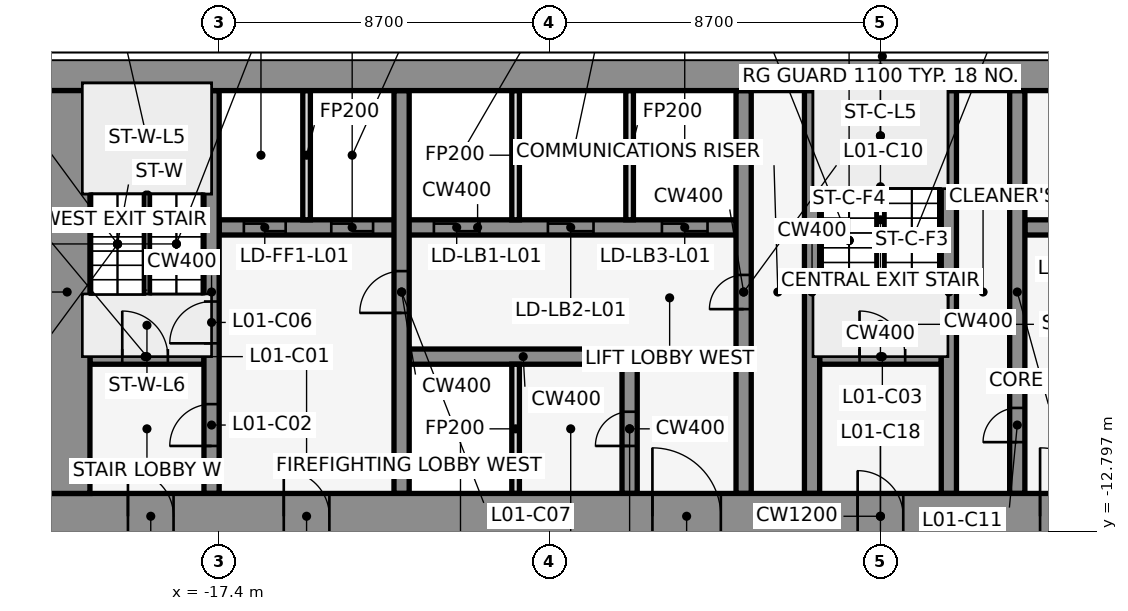
"""IFC4 building model, lengths in metres.
Left out: names, types, materials, properties, quantities, classifications, styles, units other than length and angle.
Written with IfcOpenShell. Run it as: python <this file> out.ifc"""

import sys

from ifc_helpers import new_model, si_unit, direction, frame, frame_2d, origin, place, context, subcontext, project, spatial, rectangle, extrude, element, fill, save


model = new_model("IFC4")
c1 = context("Model", 3, precision=1e-05, world=origin(), true_north=direction((0.0, 1.0)))
c2 = subcontext(c1, "Body", "Model", "MODEL_VIEW")
j1 = project(units=[si_unit("LENGTHUNIT", "METRE"), si_unit("PLANEANGLEUNIT", "RADIAN")], contexts=[c1])
p1 = place(None, origin())
s1 = spatial("IfcSite", under=j1, at=p1, CompositionType="ELEMENT")
p2 = place(p1, origin())
s2 = spatial("IfcBuilding", under=s1, at=p2, CompositionType="ELEMENT")
p3 = place(p2, frame((0.0, 0.0, 8.0)))
s3 = spatial("IfcBuildingStorey", under=s2, at=p3, CompositionType="ELEMENT", Elevation=8.0)
p4 = place(p3, frame((-20.8, -8.2, 0.0), z_axis=(0.0, 0.0, 1.0), x_axis=(1.0, 0.0, 0.0)))
e1 = element("IfcWall", 1, at=p4, inside=s3, PredefinedType="SHEAR", context=c2, shape_type="SweptSolid", body=[
    extrude(rectangle(XDim=3.0, YDim=0.4, at=frame_2d((1.5, 0.0))), origin(), (0.0, 0.0, 1.0), 6.0),
])
p5 = place(p4, frame((0.85, 0.0, 0.0)))
e2 = element("IfcOpeningElement", 2, at=p5, cuts=e1, PredefinedType="OPENING", context=c2, shape_type="SweptSolid", body=[
    extrude(rectangle(XDim=1.2, YDim=2.1, at=frame_2d((0.6, 1.05))), frame((0.0, 0.212, 0.0), z_axis=(0.0, -1.0, 0.0), x_axis=(1.0, 0.0, 0.0)), (0.0, 0.0, 1.0), 0.424),
])
p6 = place(p3, frame((-12.4, -8.2, 0.0), z_axis=(0.0, 0.0, 1.0), x_axis=(1.0, 0.0, 0.0)))
e3 = element("IfcWall", 3, at=p6, inside=s3, PredefinedType="SHEAR", context=c2, shape_type="SweptSolid", body=[
    extrude(rectangle(XDim=6.0, YDim=0.4, at=frame_2d((3.0, 0.0))), origin(), (0.0, 0.0, 1.0), 6.0),
])
p7 = place(p3, frame((-1.6, -8.2, 0.0), z_axis=(0.0, 0.0, 1.0), x_axis=(1.0, 0.0, 0.0)))
e4 = element("IfcWall", 4, at=p7, inside=s3, PredefinedType="SHEAR", context=c2, shape_type="SweptSolid", body=[
    extrude(rectangle(XDim=3.2, YDim=0.4, at=frame_2d((1.6, 0.0))), origin(), (0.0, 0.0, 1.0), 6.0),
])
p8 = place(p7, frame((1.05, 0.0, 0.0)))
e5 = element("IfcOpeningElement", 5, at=p8, cuts=e4, PredefinedType="OPENING", context=c2, shape_type="SweptSolid", body=[
    extrude(rectangle(XDim=1.2, YDim=2.1, at=frame_2d((0.6, 1.05))), frame((0.0, 0.212, 0.0), z_axis=(0.0, -1.0, 0.0), x_axis=(1.0, 0.0, 0.0)), (0.0, 0.0, 1.0), 0.424),
])
p9 = place(p3, frame((-17.4, -4.8, 0.0), z_axis=(0.0, 0.0, 1.0), x_axis=(1.0, 0.0, 0.0)))
e6 = element("IfcWall", 6, at=p9, inside=s3, PredefinedType="SHEAR", context=c2, shape_type="SweptSolid", body=[
    extrude(rectangle(XDim=13.6, YDim=0.4, at=frame_2d((6.8, 0.0))), origin(), (0.0, 0.0, 1.0), 6.0),
])
p10 = place(p9, frame((0.65, 0.0, 0.0)))
e7 = element("IfcOpeningElement", 7, at=p10, cuts=e6, PredefinedType="OPENING", context=c2, shape_type="SweptSolid", body=[
    extrude(rectangle(XDim=1.1, YDim=2.1, at=frame_2d((0.55, 1.05))), frame((0.0, 0.212, 0.0), z_axis=(0.0, -1.0, 0.0), x_axis=(1.0, 0.0, 0.0)), (0.0, 0.0, 1.0), 0.424),
])
p11 = place(p9, frame((2.95, 0.0, 0.0)))
e8 = element("IfcOpeningElement", 8, at=p11, cuts=e6, PredefinedType="OPENING", context=c2, shape_type="SweptSolid", body=[
    extrude(rectangle(XDim=1.1, YDim=2.1, at=frame_2d((0.55, 1.05))), frame((0.0, 0.212, 0.0), z_axis=(0.0, -1.0, 0.0), x_axis=(1.0, 0.0, 0.0)), (0.0, 0.0, 1.0), 0.424),
])
p12 = place(p9, frame((5.65, 0.0, 0.0)))
e9 = element("IfcOpeningElement", 9, at=p12, cuts=e6, PredefinedType="OPENING", context=c2, shape_type="SweptSolid", body=[
    extrude(rectangle(XDim=1.2, YDim=2.1, at=frame_2d((0.6, 1.05))), frame((0.0, 0.212, 0.0), z_axis=(0.0, -1.0, 0.0), x_axis=(1.0, 0.0, 0.0)), (0.0, 0.0, 1.0), 0.424),
])
p13 = place(p9, frame((8.65, 0.0, 0.0)))
e10 = element("IfcOpeningElement", 10, at=p13, cuts=e6, PredefinedType="OPENING", context=c2, shape_type="SweptSolid", body=[
    extrude(rectangle(XDim=1.2, YDim=2.1, at=frame_2d((0.6, 1.05))), frame((0.0, 0.212, 0.0), z_axis=(0.0, -1.0, 0.0), x_axis=(1.0, 0.0, 0.0)), (0.0, 0.0, 1.0), 0.424),
])
p14 = place(p9, frame((11.65, 0.0, 0.0)))
e11 = element("IfcOpeningElement", 11, at=p14, cuts=e6, PredefinedType="OPENING", context=c2, shape_type="SweptSolid", body=[
    extrude(rectangle(XDim=1.2, YDim=2.1, at=frame_2d((0.6, 1.05))), frame((0.0, 0.212, 0.0), z_axis=(0.0, -1.0, 0.0), x_axis=(1.0, 0.0, 0.0)), (0.0, 0.0, 1.0), 0.424),
])
p15 = place(p3, frame((3.8, -4.8, 0.0), z_axis=(0.0, 0.0, 1.0), x_axis=(1.0, 0.0, 0.0)))
e12 = element("IfcWall", 12, at=p15, inside=s3, PredefinedType="SHEAR", context=c2, shape_type="SweptSolid", body=[
    extrude(rectangle(XDim=13.6, YDim=0.4, at=frame_2d((6.8, 0.0))), origin(), (0.0, 0.0, 1.0), 6.0),
])
p16 = place(p15, frame((9.45, 0.0, 0.0)))
e13 = element("IfcOpeningElement", 13, at=p16, cuts=e12, PredefinedType="OPENING", context=c2, shape_type="SweptSolid", body=[
    extrude(rectangle(XDim=1.1, YDim=2.1, at=frame_2d((0.55, 1.05))), frame((0.0, 0.212, 0.0), z_axis=(0.0, -1.0, 0.0), x_axis=(1.0, 0.0, 0.0)), (0.0, 0.0, 1.0), 0.424),
])
p17 = place(p15, frame((11.85, 0.0, 0.0)))
e14 = element("IfcOpeningElement", 14, at=p17, cuts=e12, PredefinedType="OPENING", context=c2, shape_type="SweptSolid", body=[
    extrude(rectangle(XDim=1.1, YDim=2.1, at=frame_2d((0.55, 1.05))), frame((0.0, 0.212, 0.0), z_axis=(0.0, -1.0, 0.0), x_axis=(1.0, 0.0, 0.0)), (0.0, 0.0, 1.0), 0.424),
])
p18 = place(p15, frame((0.95, 0.0, 0.0)))
e15 = element("IfcOpeningElement", 15, at=p18, cuts=e12, PredefinedType="OPENING", context=c2, shape_type="SweptSolid", body=[
    extrude(rectangle(XDim=0.9, YDim=2.1, at=frame_2d((0.45, 1.05))), frame((0.0, 0.212, 0.0), z_axis=(0.0, -1.0, 0.0), x_axis=(1.0, 0.0, 0.0)), (0.0, 0.0, 1.0), 0.424),
])
p19 = place(p15, frame((3.85, 0.0, 0.0)))
e16 = element("IfcOpeningElement", 16, at=p19, cuts=e12, PredefinedType="OPENING", context=c2, shape_type="SweptSolid", body=[
    extrude(rectangle(XDim=0.9, YDim=2.1, at=frame_2d((0.45, 1.05))), frame((0.0, 0.212, 0.0), z_axis=(0.0, -1.0, 0.0), x_axis=(1.0, 0.0, 0.0)), (0.0, 0.0, 1.0), 0.424),
])
p20 = place(p15, frame((6.85, 0.0, 0.0)))
e17 = element("IfcOpeningElement", 17, at=p20, cuts=e12, PredefinedType="OPENING", context=c2, shape_type="SweptSolid", body=[
    extrude(rectangle(XDim=0.9, YDim=2.1, at=frame_2d((0.45, 1.05))), frame((0.0, 0.212, 0.0), z_axis=(0.0, -1.0, 0.0), x_axis=(1.0, 0.0, 0.0)), (0.0, 0.0, 1.0), 0.424),
])
p21 = place(p3, frame((-17.6, -11.8, 0.0), z_axis=(0.0, 0.0, 1.0), x_axis=(0.0, 1.0, 0.0)))
e18 = element("IfcWall", 18, at=p21, inside=s3, PredefinedType="SHEAR", context=c2, shape_type="SweptSolid", body=[
    extrude(rectangle(XDim=10.6, YDim=0.4, at=frame_2d((5.3, 0.0))), origin(), (0.0, 0.0, 1.0), 6.0),
])
p22 = place(p21, frame((1.25, 0.0, 0.0)))
e19 = element("IfcOpeningElement", 19, at=p22, cuts=e18, PredefinedType="OPENING", context=c2, shape_type="SweptSolid", body=[
    extrude(rectangle(XDim=1.1, YDim=2.1, at=frame_2d((0.55, 1.05))), frame((0.0, 0.212, 0.0), z_axis=(0.0, -1.0, 0.0), x_axis=(1.0, 0.0, 0.0)), (0.0, 0.0, 1.0), 0.424),
])
p23 = place(p21, frame((3.95, 0.0, 0.0)))
e20 = element("IfcOpeningElement", 20, at=p23, cuts=e18, PredefinedType="OPENING", context=c2, shape_type="SweptSolid", body=[
    extrude(rectangle(XDim=1.1, YDim=2.1, at=frame_2d((0.55, 1.05))), frame((0.0, 0.212, 0.0), z_axis=(0.0, -1.0, 0.0), x_axis=(1.0, 0.0, 0.0)), (0.0, 0.0, 1.0), 0.424),
])
p24 = place(p3, frame((-15.1, -4.6, 0.0), z_axis=(0.0, 0.0, 1.0), x_axis=(0.0, 1.0, 0.0)))
e21 = element("IfcWall", 21, at=p24, inside=s3, PredefinedType="PARTITIONING", context=c2, shape_type="SweptSolid", body=[
    extrude(rectangle(XDim=3.4, YDim=0.2, at=frame_2d((1.7, 0.0))), origin(), (0.0, 0.0, 1.0), 5.7),
])
p25 = place(p3, frame((-12.6, -11.8, 0.0), z_axis=(0.0, 0.0, 1.0), x_axis=(0.0, 1.0, 0.0)))
e22 = element("IfcWall", 22, at=p25, inside=s3, PredefinedType="SHEAR", context=c2, shape_type="SweptSolid", body=[
    extrude(rectangle(XDim=10.6, YDim=0.4, at=frame_2d((5.3, 0.0))), origin(), (0.0, 0.0, 1.0), 6.0),
])
p26 = place(p25, frame((4.75, 0.0, 0.0)))
e23 = element("IfcOpeningElement", 23, at=p26, cuts=e22, PredefinedType="OPENING", context=c2, shape_type="SweptSolid", body=[
    extrude(rectangle(XDim=1.1, YDim=2.1, at=frame_2d((0.55, 1.05))), frame((0.0, 0.212, 0.0), z_axis=(0.0, -1.0, 0.0), x_axis=(1.0, 0.0, 0.0)), (0.0, 0.0, 1.0), 0.424),
])
for number, where, z_axis, x_axis in (
    (24, (-9.6, -11.8, 0.0), (0.0, 0.0, 1.0), (0.0, 1.0, 0.0)),
    (25, (-9.6, -4.6, 0.0), (0.0, 0.0, 1.0), (0.0, 1.0, 0.0)),
):
    element("IfcWall", number, at=place(p3, frame(where, z_axis=z_axis, x_axis=x_axis)), inside=s3, PredefinedType="PARTITIONING", context=c2, shape_type="SweptSolid", body=[
        extrude(rectangle(XDim=3.4, YDim=0.2, at=frame_2d((1.7, 0.0))), origin(), (0.0, 0.0, 1.0), 5.7),
    ])
p27 = place(p3, frame((-6.6, -11.8, 0.0), z_axis=(0.0, 0.0, 1.0), x_axis=(0.0, 1.0, 0.0)))
e26 = element("IfcWall", 26, at=p27, inside=s3, PredefinedType="SHEAR", context=c2, shape_type="SweptSolid", body=[
    extrude(rectangle(XDim=3.4, YDim=0.4, at=frame_2d((1.7, 0.0))), origin(), (0.0, 0.0, 1.0), 6.0),
])
p28 = place(p27, frame((1.25, 0.0, 0.0)))
e27 = element("IfcOpeningElement", 27, at=p28, cuts=e26, PredefinedType="OPENING", context=c2, shape_type="SweptSolid", body=[
    extrude(rectangle(XDim=0.9, YDim=2.1, at=frame_2d((0.45, 1.05))), frame((0.0, 0.212, 0.0), z_axis=(0.0, -1.0, 0.0), x_axis=(1.0, 0.0, 0.0)), (0.0, 0.0, 1.0), 0.424),
])
p29 = place(p3, frame((-6.6, -4.6, 0.0), z_axis=(0.0, 0.0, 1.0), x_axis=(0.0, 1.0, 0.0)))
e28 = element("IfcWall", 28, at=p29, inside=s3, PredefinedType="PARTITIONING", context=c2, shape_type="SweptSolid", body=[
    extrude(rectangle(XDim=3.4, YDim=0.2, at=frame_2d((1.7, 0.0))), origin(), (0.0, 0.0, 1.0), 5.7),
])
p30 = place(p3, frame((-3.6, -11.8, 0.0), z_axis=(0.0, 0.0, 1.0), x_axis=(0.0, 1.0, 0.0)))
e29 = element("IfcWall", 29, at=p30, inside=s3, PredefinedType="SHEAR", context=c2, shape_type="SweptSolid", body=[
    extrude(rectangle(XDim=10.6, YDim=0.4, at=frame_2d((5.3, 0.0))), origin(), (0.0, 0.0, 1.0), 6.0),
])
p31 = place(p30, frame((4.85, 0.0, 0.0)))
e30 = element("IfcOpeningElement", 30, at=p31, cuts=e29, PredefinedType="OPENING", context=c2, shape_type="SweptSolid", body=[
    extrude(rectangle(XDim=0.9, YDim=2.1, at=frame_2d((0.45, 1.05))), frame((0.0, 0.212, 0.0), z_axis=(0.0, -1.0, 0.0), x_axis=(1.0, 0.0, 0.0)), (0.0, 0.0, 1.0), 0.424),
])
for number, where, z_axis, x_axis in (
    (31, (-1.8, -11.8, 0.0), (0.0, 0.0, 1.0), (0.0, 1.0, 0.0)),
    (32, (1.8, -11.8, 0.0), (0.0, 0.0, 1.0), (0.0, 1.0, 0.0)),
):
    element("IfcWall", number, at=place(p3, frame(where, z_axis=z_axis, x_axis=x_axis)), inside=s3, PredefinedType="SHEAR", context=c2, shape_type="SweptSolid", body=[
        extrude(rectangle(XDim=10.6, YDim=0.4, at=frame_2d((5.3, 0.0))), origin(), (0.0, 0.0, 1.0), 6.0),
    ])
p32 = place(p3, frame((3.6, -11.8, 0.0), z_axis=(0.0, 0.0, 1.0), x_axis=(0.0, 1.0, 0.0)))
e33 = element("IfcWall", 33, at=p32, inside=s3, PredefinedType="SHEAR", context=c2, shape_type="SweptSolid", body=[
    extrude(rectangle(XDim=10.6, YDim=0.4, at=frame_2d((5.3, 0.0))), origin(), (0.0, 0.0, 1.0), 6.0),
])
p33 = place(p32, frame((1.35, 0.0, 0.0)))
e34 = element("IfcOpeningElement", 34, at=p33, cuts=e33, PredefinedType="OPENING", context=c2, shape_type="SweptSolid", body=[
    extrude(rectangle(XDim=0.9, YDim=2.1, at=frame_2d((0.45, 1.05))), frame((0.0, 0.212, 0.0), z_axis=(0.0, -1.0, 0.0), x_axis=(1.0, 0.0, 0.0)), (0.0, 0.0, 1.0), 0.424),
])
p34 = place(p3, frame((-22.0, -0.6, 0.0), z_axis=(0.0, 0.0, 1.0), x_axis=(1.0, 0.0, 0.0)))
e35 = element("IfcWall", 35, at=p34, inside=s3, PredefinedType="SHEAR", context=c2, shape_type="SweptSolid", body=[
    extrude(rectangle(XDim=44.0, YDim=1.2, at=frame_2d((22.0, 0.0))), origin(), (0.0, 0.0, 1.0), 6.0),
])
p35 = place(p3, frame((-22.0, -12.4, 0.0), z_axis=(0.0, 0.0, 1.0), x_axis=(1.0, 0.0, 0.0)))
e36 = element("IfcWall", 36, at=p35, inside=s3, PredefinedType="SHEAR", context=c2, shape_type="SweptSolid", body=[
    extrude(rectangle(XDim=44.0, YDim=1.2, at=frame_2d((22.0, 0.0))), origin(), (0.0, 0.0, 1.0), 6.0),
])
p36 = place(p35, frame((2.2, 0.0, 0.0)))
e37 = element("IfcOpeningElement", 37, at=p36, cuts=e36, PredefinedType="OPENING", context=c2, shape_type="SweptSolid", body=[
    extrude(rectangle(XDim=1.2, YDim=2.1, at=frame_2d((0.6, 1.05))), frame((0.0, 0.612, 0.0), z_axis=(0.0, -1.0, 0.0), x_axis=(1.0, 0.0, 0.0)), (0.0, 0.0, 1.0), 1.224),
])
p37 = place(p35, frame((21.4, 0.0, 0.0)))
e38 = element("IfcOpeningElement", 38, at=p37, cuts=e36, PredefinedType="OPENING", context=c2, shape_type="SweptSolid", body=[
    extrude(rectangle(XDim=1.2, YDim=2.1, at=frame_2d((0.6, 1.05))), frame((0.0, 0.612, 0.0), z_axis=(0.0, -1.0, 0.0), x_axis=(1.0, 0.0, 0.0)), (0.0, 0.0, 1.0), 1.224),
])
p38 = place(p35, frame((40.6, 0.0, 0.0)))
e39 = element("IfcOpeningElement", 39, at=p38, cuts=e36, PredefinedType="OPENING", context=c2, shape_type="SweptSolid", body=[
    extrude(rectangle(XDim=1.2, YDim=2.1, at=frame_2d((0.6, 1.05))), frame((0.0, 0.612, 0.0), z_axis=(0.0, -1.0, 0.0), x_axis=(1.0, 0.0, 0.0)), (0.0, 0.0, 1.0), 1.224),
])
p39 = place(p35, frame((16.0, 0.0, 0.0)))
e40 = element("IfcOpeningElement", 40, at=p39, cuts=e36, PredefinedType="OPENING", context=c2, shape_type="SweptSolid", body=[
    extrude(rectangle(XDim=1.8, YDim=2.1, at=frame_2d((0.9, 1.05))), frame((0.0, 0.612, 0.0), z_axis=(0.0, -1.0, 0.0), x_axis=(1.0, 0.0, 0.0)), (0.0, 0.0, 1.0), 1.224),
])
p40 = place(p35, frame((6.3, 0.0, 0.0)))
e41 = element("IfcOpeningElement", 41, at=p40, cuts=e36, PredefinedType="OPENING", context=c2, shape_type="SweptSolid", body=[
    extrude(rectangle(XDim=1.2, YDim=2.1, at=frame_2d((0.6, 1.05))), frame((0.0, 0.612, 0.0), z_axis=(0.0, -1.0, 0.0), x_axis=(1.0, 0.0, 0.0)), (0.0, 0.0, 1.0), 1.224),
])
p41 = place(p35, frame((26.2, 0.0, 0.0)))
e42 = element("IfcOpeningElement", 42, at=p41, cuts=e36, PredefinedType="OPENING", context=c2, shape_type="SweptSolid", body=[
    extrude(rectangle(XDim=1.8, YDim=2.1, at=frame_2d((0.9, 1.05))), frame((0.0, 0.612, 0.0), z_axis=(0.0, -1.0, 0.0), x_axis=(1.0, 0.0, 0.0)), (0.0, 0.0, 1.0), 1.224),
])
p42 = place(p35, frame((36.5, 0.0, 0.0)))
e43 = element("IfcOpeningElement", 43, at=p42, cuts=e36, PredefinedType="OPENING", context=c2, shape_type="SweptSolid", body=[
    extrude(rectangle(XDim=1.2, YDim=2.1, at=frame_2d((0.6, 1.05))), frame((0.0, 0.612, 0.0), z_axis=(0.0, -1.0, 0.0), x_axis=(1.0, 0.0, 0.0)), (0.0, 0.0, 1.0), 1.224),
])
p43 = place(p3, frame((-21.4, -11.8, 0.0), z_axis=(0.0, 0.0, 1.0), x_axis=(0.0, 1.0, 0.0)))
e44 = element("IfcWall", 44, at=p43, inside=s3, PredefinedType="SHEAR", context=c2, shape_type="SweptSolid", body=[
    extrude(rectangle(XDim=10.6, YDim=1.2, at=frame_2d((5.3, 0.0))), origin(), (0.0, 0.0, 1.0), 6.0),
])
p44 = place(p5, origin())
e45 = element("IfcDoor", 45, at=p44, inside=s3, OperationType="SINGLE_SWING_LEFT", PredefinedType="DOOR", context=c2, shape_type="SweptSolid", body=[
    extrude(rectangle(XDim=1.2, YDim=2.1, at=frame_2d((0.6, 1.05))), frame((0.0, 0.025, 0.0), z_axis=(0.0, -1.0, 0.0), x_axis=(1.0, 0.0, 0.0)), (0.0, 0.0, 1.0), 0.05),
])
fill(e2, e45)
p45 = place(p22, frame((1.1, 0.0, 0.0), z_axis=(0.0, 0.0, 1.0), x_axis=(-1.0, 0.0, 0.0)))
e46 = element("IfcDoor", 46, at=p45, inside=s3, OperationType="SINGLE_SWING_LEFT", PredefinedType="DOOR", context=c2, shape_type="SweptSolid", body=[
    extrude(rectangle(XDim=1.1, YDim=2.1, at=frame_2d((0.55, 1.05))), frame((0.0, 0.025, 0.0), z_axis=(0.0, -1.0, 0.0), x_axis=(1.0, 0.0, 0.0)), (0.0, 0.0, 1.0), 0.05),
])
fill(e19, e46)
p46 = place(p8, origin())
e47 = element("IfcDoor", 47, at=p46, inside=s3, OperationType="SINGLE_SWING_LEFT", PredefinedType="DOOR", context=c2, shape_type="SweptSolid", body=[
    extrude(rectangle(XDim=1.2, YDim=2.1, at=frame_2d((0.6, 1.05))), frame((0.0, 0.025, 0.0), z_axis=(0.0, -1.0, 0.0), x_axis=(1.0, 0.0, 0.0)), (0.0, 0.0, 1.0), 0.05),
])
fill(e5, e47)
p47 = place(p10, origin())
e48 = element("IfcDoor", 48, at=p47, inside=s3, OperationType="DOUBLE_DOOR_SLIDING", PredefinedType="DOOR", context=c2, shape_type="SweptSolid", body=[
    extrude(rectangle(XDim=1.1, YDim=2.1, at=frame_2d((0.55, 1.05))), frame((0.0, 0.025, 0.0), z_axis=(0.0, -1.0, 0.0), x_axis=(1.0, 0.0, 0.0)), (0.0, 0.0, 1.0), 0.05),
])
fill(e7, e48)
p48 = place(p11, origin())
e49 = element("IfcDoor", 49, at=p48, inside=s3, OperationType="DOUBLE_DOOR_SLIDING", PredefinedType="DOOR", context=c2, shape_type="SweptSolid", body=[
    extrude(rectangle(XDim=1.1, YDim=2.1, at=frame_2d((0.55, 1.05))), frame((0.0, 0.025, 0.0), z_axis=(0.0, -1.0, 0.0), x_axis=(1.0, 0.0, 0.0)), (0.0, 0.0, 1.0), 0.05),
])
fill(e8, e49)
p49 = place(p12, origin())
e50 = element("IfcDoor", 50, at=p49, inside=s3, OperationType="DOUBLE_DOOR_SLIDING", PredefinedType="DOOR", context=c2, shape_type="SweptSolid", body=[
    extrude(rectangle(XDim=1.2, YDim=2.1, at=frame_2d((0.6, 1.05))), frame((0.0, 0.025, 0.0), z_axis=(0.0, -1.0, 0.0), x_axis=(1.0, 0.0, 0.0)), (0.0, 0.0, 1.0), 0.05),
])
fill(e9, e50)
p50 = place(p13, origin())
e51 = element("IfcDoor", 51, at=p50, inside=s3, OperationType="DOUBLE_DOOR_SLIDING", PredefinedType="DOOR", context=c2, shape_type="SweptSolid", body=[
    extrude(rectangle(XDim=1.2, YDim=2.1, at=frame_2d((0.6, 1.05))), frame((0.0, 0.025, 0.0), z_axis=(0.0, -1.0, 0.0), x_axis=(1.0, 0.0, 0.0)), (0.0, 0.0, 1.0), 0.05),
])
fill(e10, e51)
p51 = place(p14, origin())
e52 = element("IfcDoor", 52, at=p51, inside=s3, OperationType="DOUBLE_DOOR_SLIDING", PredefinedType="DOOR", context=c2, shape_type="SweptSolid", body=[
    extrude(rectangle(XDim=1.2, YDim=2.1, at=frame_2d((0.6, 1.05))), frame((0.0, 0.025, 0.0), z_axis=(0.0, -1.0, 0.0), x_axis=(1.0, 0.0, 0.0)), (0.0, 0.0, 1.0), 0.05),
])
fill(e11, e52)
p52 = place(p23, frame((1.1, 0.0, 0.0), z_axis=(0.0, 0.0, 1.0), x_axis=(-1.0, 0.0, 0.0)))
e53 = element("IfcDoor", 53, at=p52, inside=s3, OperationType="SINGLE_SWING_LEFT", PredefinedType="DOOR", context=c2, shape_type="SweptSolid", body=[
    extrude(rectangle(XDim=1.1, YDim=2.1, at=frame_2d((0.55, 1.05))), frame((0.0, 0.025, 0.0), z_axis=(0.0, -1.0, 0.0), x_axis=(1.0, 0.0, 0.0)), (0.0, 0.0, 1.0), 0.05),
])
fill(e20, e53)
p53 = place(p26, origin())
e54 = element("IfcDoor", 54, at=p53, inside=s3, OperationType="SINGLE_SWING_LEFT", PredefinedType="DOOR", context=c2, shape_type="SweptSolid", body=[
    extrude(rectangle(XDim=1.1, YDim=2.1, at=frame_2d((0.55, 1.05))), frame((0.0, 0.025, 0.0), z_axis=(0.0, -1.0, 0.0), x_axis=(1.0, 0.0, 0.0)), (0.0, 0.0, 1.0), 0.05),
])
fill(e23, e54)
p54 = place(p31, frame((0.9, 0.0, 0.0), z_axis=(0.0, 0.0, 1.0), x_axis=(-1.0, 0.0, 0.0)))
e55 = element("IfcDoor", 55, at=p54, inside=s3, OperationType="SINGLE_SWING_LEFT", PredefinedType="DOOR", context=c2, shape_type="SweptSolid", body=[
    extrude(rectangle(XDim=0.9, YDim=2.1, at=frame_2d((0.45, 1.05))), frame((0.0, 0.025, 0.0), z_axis=(0.0, -1.0, 0.0), x_axis=(1.0, 0.0, 0.0)), (0.0, 0.0, 1.0), 0.05),
])
fill(e30, e55)
p55 = place(p33, origin())
e56 = element("IfcDoor", 56, at=p55, inside=s3, OperationType="SINGLE_SWING_LEFT", PredefinedType="DOOR", context=c2, shape_type="SweptSolid", body=[
    extrude(rectangle(XDim=0.9, YDim=2.1, at=frame_2d((0.45, 1.05))), frame((0.0, 0.025, 0.0), z_axis=(0.0, -1.0, 0.0), x_axis=(1.0, 0.0, 0.0)), (0.0, 0.0, 1.0), 0.05),
])
fill(e34, e56)
p56 = place(p28, origin())
e57 = element("IfcDoor", 57, at=p56, inside=s3, OperationType="SINGLE_SWING_LEFT", PredefinedType="DOOR", context=c2, shape_type="SweptSolid", body=[
    extrude(rectangle(XDim=0.9, YDim=2.1, at=frame_2d((0.45, 1.05))), frame((0.0, 0.025, 0.0), z_axis=(0.0, -1.0, 0.0), x_axis=(1.0, 0.0, 0.0)), (0.0, 0.0, 1.0), 0.05),
])
fill(e27, e57)
p57 = place(p36, frame((1.2, 0.0, 0.0), z_axis=(0.0, 0.0, 1.0), x_axis=(-1.0, 0.0, 0.0)))
e58 = element("IfcDoor", 58, at=p57, inside=s3, OperationType="SINGLE_SWING_RIGHT", PredefinedType="DOOR", context=c2, shape_type="SweptSolid", body=[
    extrude(rectangle(XDim=1.2, YDim=2.1, at=frame_2d((0.6, 1.05))), frame((0.0, 0.025, 0.0), z_axis=(0.0, -1.0, 0.0), x_axis=(1.0, 0.0, 0.0)), (0.0, 0.0, 1.0), 0.05),
])
fill(e37, e58)
p58 = place(p37, frame((1.2, 0.0, 0.0), z_axis=(0.0, 0.0, 1.0), x_axis=(-1.0, 0.0, 0.0)))
e59 = element("IfcDoor", 59, at=p58, inside=s3, OperationType="SINGLE_SWING_RIGHT", PredefinedType="DOOR", context=c2, shape_type="SweptSolid", body=[
    extrude(rectangle(XDim=1.2, YDim=2.1, at=frame_2d((0.6, 1.05))), frame((0.0, 0.025, 0.0), z_axis=(0.0, -1.0, 0.0), x_axis=(1.0, 0.0, 0.0)), (0.0, 0.0, 1.0), 0.05),
])
fill(e38, e59)
p59 = place(p39, origin())
e60 = element("IfcDoor", 60, at=p59, inside=s3, OperationType="SINGLE_SWING_LEFT", PredefinedType="DOOR", context=c2, shape_type="SweptSolid", body=[
    extrude(rectangle(XDim=1.8, YDim=2.1, at=frame_2d((0.9, 1.05))), frame((0.0, 0.025, 0.0), z_axis=(0.0, -1.0, 0.0), x_axis=(1.0, 0.0, 0.0)), (0.0, 0.0, 1.0), 0.05),
])
fill(e40, e60)
p60 = place(p40, frame((1.2, 0.0, 0.0), z_axis=(0.0, 0.0, 1.0), x_axis=(-1.0, 0.0, 0.0)))
e61 = element("IfcDoor", 61, at=p60, inside=s3, OperationType="SINGLE_SWING_RIGHT", PredefinedType="DOOR", context=c2, shape_type="SweptSolid", body=[
    extrude(rectangle(XDim=1.2, YDim=2.1, at=frame_2d((0.6, 1.05))), frame((0.0, 0.025, 0.0), z_axis=(0.0, -1.0, 0.0), x_axis=(1.0, 0.0, 0.0)), (0.0, 0.0, 1.0), 0.05),
])
fill(e41, e61)
p61 = place(p41, origin())
e62 = element("IfcDoor", 62, at=p61, inside=s3, OperationType="SINGLE_SWING_LEFT", PredefinedType="DOOR", context=c2, shape_type="SweptSolid", body=[
    extrude(rectangle(XDim=1.8, YDim=2.1, at=frame_2d((0.9, 1.05))), frame((0.0, 0.025, 0.0), z_axis=(0.0, -1.0, 0.0), x_axis=(1.0, 0.0, 0.0)), (0.0, 0.0, 1.0), 0.05),
])
fill(e42, e62)
save(model, sys.argv[1])
